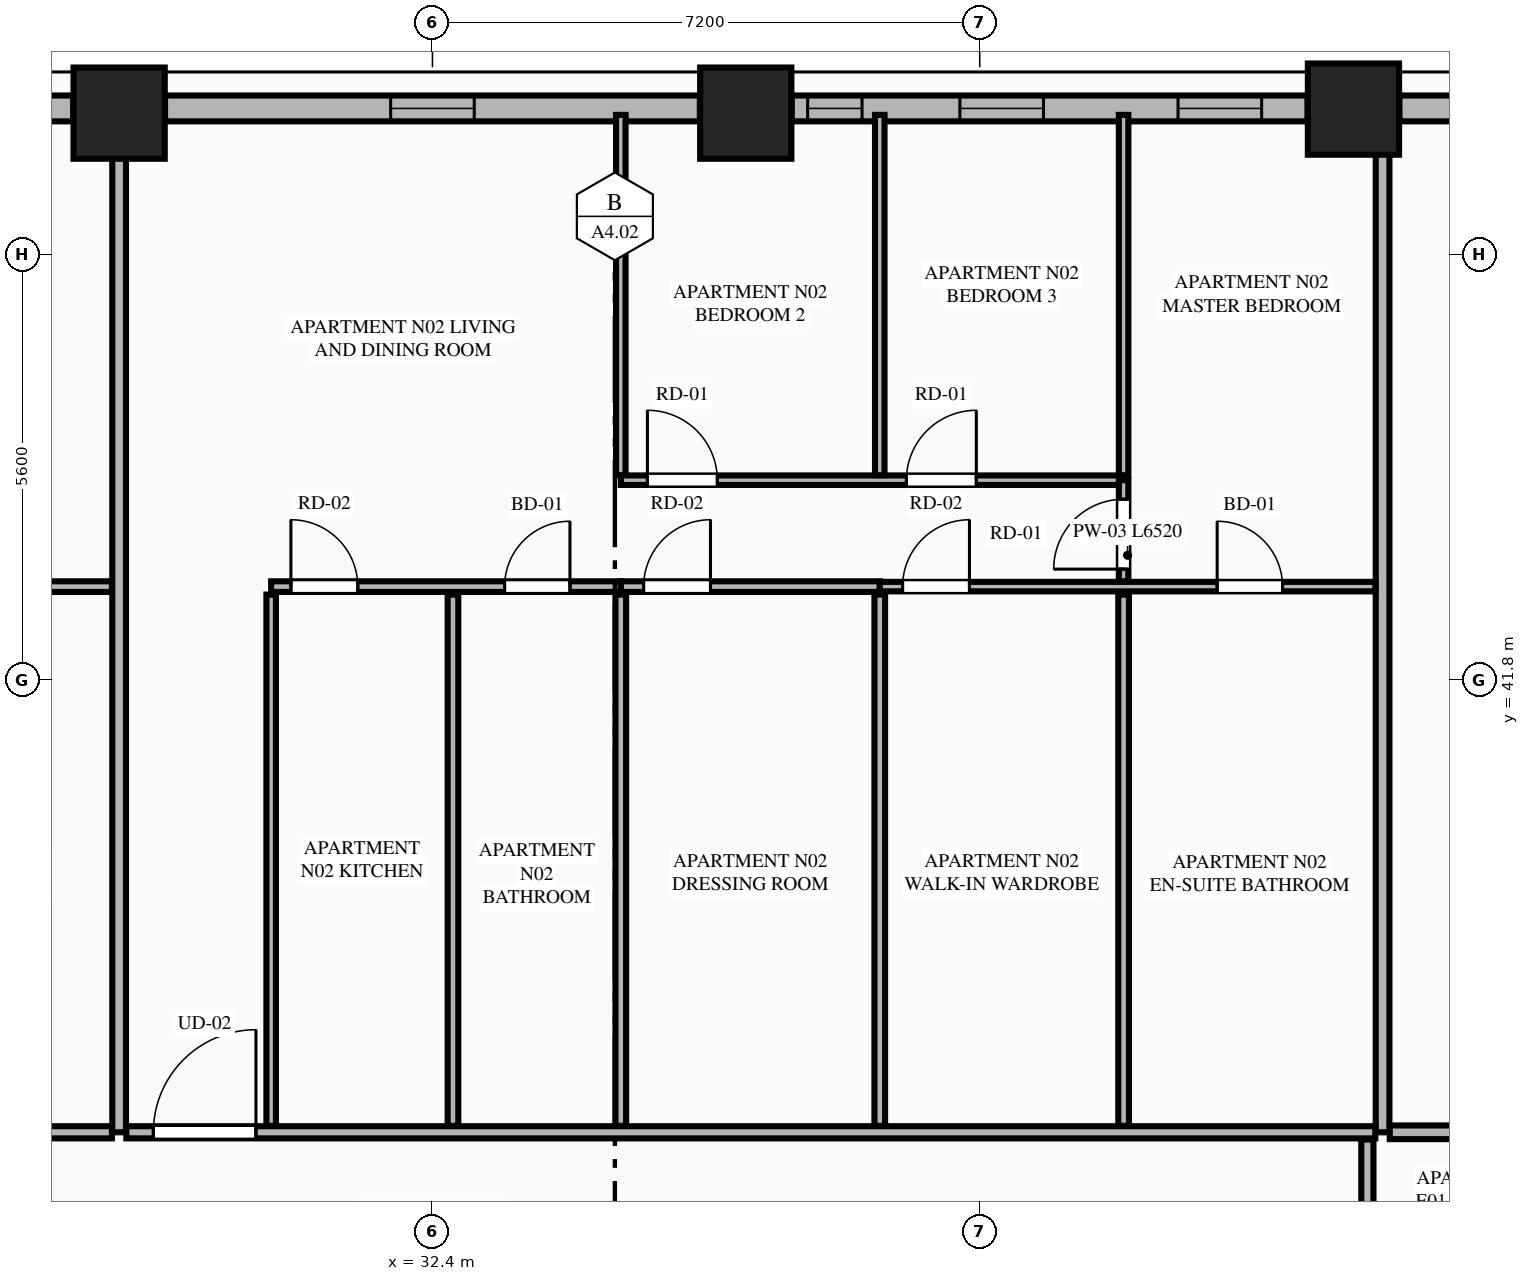
"""IFC4 building model, lengths in metres.
Left out: names, types, materials, properties, quantities, classifications, styles, units other than length and angle.
Written with IfcOpenShell. Run it as: python <this file> out.ifc"""

import sys

from ifc_helpers import new_model, si_unit, direction, frame, frame_2d, origin, origin_2d, place, context, subcontext, project, spatial, rectangle, extrude, element, fill, save


model = new_model("IFC4")
c1 = context("Model", 3, precision=1e-05, world=origin(), true_north=direction((0.0, 1.0)))
c2 = subcontext(c1, "Body", "Model", "MODEL_VIEW")
j1 = project(units=[si_unit("LENGTHUNIT", "METRE"), si_unit("PLANEANGLEUNIT", "RADIAN")], contexts=[c1])
p1 = place(None, origin())
s1 = spatial("IfcSite", under=j1, at=p1, CompositionType="ELEMENT")
p2 = place(p1, origin())
s2 = spatial("IfcBuilding", under=s1, at=p2, CompositionType="ELEMENT")
p3 = place(p2, frame((0.0, 0.0, 60.4)))
s3 = spatial("IfcBuildingStorey", under=s2, at=p3, CompositionType="ELEMENT", Elevation=60.4)
for number, where, z_axis, x_axis in (
    (1, (44.517, 49.311, 0.0), (0.0, 0.0, 1.0), (1.0, 0.0, 0.0)),
    (2, (36.522, 49.258, 0.0), (0.0, 0.0, 1.0), (1.0, 0.0, 0.0)),
    (3, (28.278, 49.258, 0.0), (0.0, 0.0, 1.0), (1.0, 0.0, 0.0)),
):
    element("IfcColumn", number, at=place(p3, frame(where, z_axis=z_axis, x_axis=x_axis)), inside=s3, PredefinedType="COLUMN", context=c2, shape_type="SweptSolid", body=[
        extrude(rectangle(XDim=1.2, YDim=1.2, at=origin_2d()), origin(), (0.0, 0.0, 1.0), 3.55),
    ])
p4 = place(p3, frame((46.366, 49.32, 0.0), z_axis=(0.0, 0.0, 1.0), x_axis=(-1.0, 0.0, 0.0)))
e4 = element("IfcWall", 4, at=p4, inside=s3, PredefinedType="STANDARD", context=c2, shape_type="SweptSolid", body=[
    extrude(rectangle(XDim=1.245, YDim=0.34, at=frame_2d((0.623, 0.0))), origin(), (0.0, 0.0, 1.0), 3.33),
])
p5 = place(p3, frame((43.913, 49.32, 0.0), z_axis=(0.0, 0.0, 1.0), x_axis=(-1.0, 0.0, 0.0)))
e5 = element("IfcWall", 5, at=p5, inside=s3, PredefinedType="STANDARD", context=c2, shape_type="SweptSolid", body=[
    extrude(rectangle(XDim=6.787, YDim=0.34, at=frame_2d((3.394, 0.0))), origin(), (0.0, 0.0, 1.0), 2.787),
])
p6 = place(p5, frame((0.604, 0.0, 0.75)))
e6 = element("IfcOpeningElement", 6, at=p6, cuts=e5, PredefinedType="OPENING", context=c2, shape_type="SweptSolid", body=[
    extrude(rectangle(XDim=1.1, YDim=1.887, at=frame_2d((0.55, 0.943))), frame((0.0, 0.18, 0.0), z_axis=(0.0, -1.0, 0.0), x_axis=(1.0, 0.0, 0.0)), (0.0, 0.0, 1.0), 0.36),
])
p7 = place(p5, frame((3.474, 0.0, 0.75)))
e7 = element("IfcOpeningElement", 7, at=p7, cuts=e5, PredefinedType="OPENING", context=c2, shape_type="SweptSolid", body=[
    extrude(rectangle(XDim=1.1, YDim=1.887, at=frame_2d((0.55, 0.943))), frame((0.0, 0.18, 0.0), z_axis=(0.0, -1.0, 0.0), x_axis=(1.0, 0.0, 0.0)), (0.0, 0.0, 1.0), 0.36),
])
p8 = place(p5, frame((5.861, 0.0, 0.75)))
e8 = element("IfcOpeningElement", 8, at=p8, cuts=e5, PredefinedType="OPENING", context=c2, shape_type="SweptSolid", body=[
    extrude(rectangle(XDim=0.716, YDim=1.887, at=frame_2d((0.358, 0.943))), frame((0.0, 0.18, 0.0), z_axis=(0.0, -1.0, 0.0), x_axis=(1.0, 0.0, 0.0)), (0.0, 0.0, 1.0), 0.36),
])
p9 = place(p3, frame((35.918, 49.32, 0.0), z_axis=(0.0, 0.0, 1.0), x_axis=(-1.0, 0.0, 0.0)))
e9 = element("IfcWall", 9, at=p9, inside=s3, PredefinedType="STANDARD", context=c2, shape_type="SweptSolid", body=[
    extrude(rectangle(XDim=7.036, YDim=0.34, at=frame_2d((3.518, 0.0))), origin(), (0.0, 0.0, 1.0), 2.787),
])
p10 = place(p9, frame((2.968, 0.0, 0.75)))
e10 = element("IfcOpeningElement", 10, at=p10, cuts=e9, PredefinedType="OPENING", context=c2, shape_type="SweptSolid", body=[
    extrude(rectangle(XDim=1.1, YDim=1.887, at=frame_2d((0.55, 0.943))), frame((0.0, 0.18, 0.0), z_axis=(0.0, -1.0, 0.0), x_axis=(1.0, 0.0, 0.0)), (0.0, 0.0, 1.0), 0.36),
])
p11 = place(p3, frame((27.674, 49.32, 0.0), z_axis=(0.0, 0.0, 1.0), x_axis=(-1.0, 0.0, 0.0)))
e11 = element("IfcWall", 11, at=p11, inside=s3, PredefinedType="STANDARD", context=c2, shape_type="SweptSolid", body=[
    extrude(rectangle(XDim=6.787, YDim=0.34, at=frame_2d((3.394, 0.0))), origin(), (0.0, 0.0, 1.0), 2.787),
])
p12 = place(p11, frame((2.843, 0.0, 0.75)))
e12 = element("IfcOpeningElement", 12, at=p12, cuts=e11, PredefinedType="OPENING", context=c2, shape_type="SweptSolid", body=[
    extrude(rectangle(XDim=1.1, YDim=1.887, at=frame_2d((0.55, 0.943))), frame((0.0, 0.18, 0.0), z_axis=(0.0, -1.0, 0.0), x_axis=(1.0, 0.0, 0.0)), (0.0, 0.0, 1.0), 0.36),
])
p13 = place(p3, frame((28.278, 35.85, 0.0), z_axis=(0.0, 0.0, 1.0), x_axis=(0.0, 1.0, 0.0)))
e13 = element("IfcWall", 13, at=p13, inside=s3, PredefinedType="PARTITIONING", context=c2, shape_type="SweptSolid", body=[
    extrude(rectangle(XDim=13.295, YDim=0.18, at=frame_2d((6.647, 0.0))), origin(), (0.0, 0.0, 1.0), 2.636),
])
p14 = place(p3, frame((44.9, 35.85, 0.0), z_axis=(0.0, 0.0, 1.0), x_axis=(0.0, 1.0, 0.0)))
e14 = element("IfcWall", 14, at=p14, inside=s3, PredefinedType="PARTITIONING", context=c2, shape_type="SweptSolid", body=[
    extrude(rectangle(XDim=13.295, YDim=0.18, at=frame_2d((6.647, 0.0))), origin(), (0.0, 0.0, 1.0), 3.33),
])
p15 = place(p3, frame((19.995, 35.85, 0.0), z_axis=(0.0, 0.0, 1.0), x_axis=(1.0, 0.0, 0.0)))
e15 = element("IfcWall", 15, at=p15, inside=s3, PredefinedType="PARTITIONING", context=c2, shape_type="SweptSolid", body=[
    extrude(rectangle(XDim=8.188, YDim=0.16, at=frame_2d((4.094, 0.0))), origin(), (0.0, 0.0, 1.0), 3.33),
])
p16 = place(p15, frame((0.705, 0.0, 0.0)))
e16 = element("IfcOpeningElement", 16, at=p16, cuts=e15, PredefinedType="OPENING", context=c2, shape_type="SweptSolid", body=[
    extrude(rectangle(XDim=1.02, YDim=2.25, at=frame_2d((0.51, 1.125))), frame((0.0, 0.09, 0.0), z_axis=(0.0, -1.0, 0.0), x_axis=(1.0, 0.0, 0.0)), (0.0, 0.0, 1.0), 0.18),
])
p17 = place(p3, frame((22.25, 43.029, 0.0), z_axis=(0.0, 0.0, 1.0), x_axis=(1.0, 0.0, 0.0)))
e17 = element("IfcWall", 17, at=p17, inside=s3, PredefinedType="PLUMBINGWALL", context=c2, shape_type="SweptSolid", body=[
    extrude(rectangle(XDim=5.933, YDim=0.14, at=frame_2d((2.967, 0.0))), origin(), (0.0, 0.0, 1.0), 3.33),
])
p18 = place(p17, frame((3.988, 0.0, 0.0)))
e18 = element("IfcOpeningElement", 18, at=p18, cuts=e17, PredefinedType="OPENING", context=c2, shape_type="SweptSolid", body=[
    extrude(rectangle(XDim=0.86, YDim=2.1, at=frame_2d((0.43, 1.05))), frame((0.0, 0.08, 0.0), z_axis=(0.0, -1.0, 0.0), x_axis=(1.0, 0.0, 0.0)), (0.0, 0.0, 1.0), 0.16),
])
p19 = place(p17, frame((0.22, 0.0, 0.0)))
e19 = element("IfcOpeningElement", 19, at=p19, cuts=e17, PredefinedType="OPENING", context=c2, shape_type="SweptSolid", body=[
    extrude(rectangle(XDim=0.88, YDim=2.15, at=frame_2d((0.44, 1.075))), frame((0.0, 0.08, 0.0), z_axis=(0.0, -1.0, 0.0), x_axis=(1.0, 0.0, 0.0)), (0.0, 0.0, 1.0), 0.16),
])
p20 = place(p3, frame((28.373, 35.85, 0.0), z_axis=(0.0, 0.0, 1.0), x_axis=(1.0, 0.0, 0.0)))
e20 = element("IfcWall", 20, at=p20, inside=s3, PredefinedType="PARTITIONING", context=c2, shape_type="SweptSolid", body=[
    extrude(rectangle(XDim=16.432, YDim=0.16, at=frame_2d((8.216, 0.0))), origin(), (0.0, 0.0, 1.0), 3.33),
])
p21 = place(p20, frame((0.355, 0.0, 0.0)))
e21 = element("IfcOpeningElement", 21, at=p21, cuts=e20, PredefinedType="OPENING", context=c2, shape_type="SweptSolid", body=[
    extrude(rectangle(XDim=1.35, YDim=2.35, at=frame_2d((0.675, 1.175))), frame((0.0, 0.09, 0.0), z_axis=(0.0, -1.0, 0.0), x_axis=(1.0, 0.0, 0.0)), (0.0, 0.0, 1.0), 0.18),
])
p22 = place(p3, frame((30.278, 35.935, 0.0), z_axis=(0.0, 0.0, 1.0), x_axis=(0.0, 1.0, 0.0)))
e22 = element("IfcWall", 22, at=p22, inside=s3, PredefinedType="PARTITIONING", context=c2, shape_type="SweptSolid", body=[
    extrude(rectangle(XDim=6.989, YDim=0.125, at=frame_2d((3.495, 0.0))), origin(), (0.0, 0.0, 1.0), 3.33),
])
p23 = place(p3, frame((30.278, 43.029, 0.0), z_axis=(0.0, 0.0, 1.0), x_axis=(1.0, 0.0, 0.0)))
e23 = element("IfcWall", 23, at=p23, inside=s3, PredefinedType="PLUMBINGWALL", context=c2, shape_type="SweptSolid", body=[
    extrude(rectangle(XDim=4.6, YDim=0.14, at=frame_2d((2.3, 0.0))), origin(), (0.0, 0.0, 1.0), 3.33),
])
p24 = place(p23, frame((3.071, 0.0, 0.0)))
e24 = element("IfcOpeningElement", 24, at=p24, cuts=e23, PredefinedType="OPENING", context=c2, shape_type="SweptSolid", body=[
    extrude(rectangle(XDim=0.86, YDim=2.1, at=frame_2d((0.43, 1.05))), frame((0.0, 0.08, 0.0), z_axis=(0.0, -1.0, 0.0), x_axis=(1.0, 0.0, 0.0)), (0.0, 0.0, 1.0), 0.16),
])
p25 = place(p23, frame((0.26, 0.0, 0.0)))
e25 = element("IfcOpeningElement", 25, at=p25, cuts=e23, PredefinedType="OPENING", context=c2, shape_type="SweptSolid", body=[
    extrude(rectangle(XDim=0.88, YDim=2.15, at=frame_2d((0.44, 1.075))), frame((0.0, 0.08, 0.0), z_axis=(0.0, -1.0, 0.0), x_axis=(1.0, 0.0, 0.0)), (0.0, 0.0, 1.0), 0.16),
])
p26 = place(p3, frame((34.878, 43.029, 0.0), z_axis=(0.0, 0.0, 1.0), x_axis=(1.0, 0.0, 0.0)))
e26 = element("IfcWall", 26, at=p26, inside=s3, PredefinedType="PLUMBINGWALL", context=c2, shape_type="SweptSolid", body=[
    extrude(rectangle(XDim=3.407, YDim=0.14, at=frame_2d((1.704, 0.0))), origin(), (0.0, 0.0, 1.0), 3.33),
])
p27 = place(p26, frame((0.3, 0.0, 0.0)))
e27 = element("IfcOpeningElement", 27, at=p27, cuts=e26, PredefinedType="OPENING", context=c2, shape_type="SweptSolid", body=[
    extrude(rectangle(XDim=0.88, YDim=2.15, at=frame_2d((0.44, 1.075))), frame((0.0, 0.08, 0.0), z_axis=(0.0, -1.0, 0.0), x_axis=(1.0, 0.0, 0.0)), (0.0, 0.0, 1.0), 0.16),
])
p28 = place(p3, frame((38.285, 43.029, 0.0), z_axis=(0.0, 0.0, 1.0), x_axis=(1.0, 0.0, 0.0)))
e28 = element("IfcWall", 28, at=p28, inside=s3, PredefinedType="PARTITIONING", context=c2, shape_type="SweptSolid", body=[
    extrude(rectangle(XDim=6.52, YDim=0.125, at=frame_2d((3.26, 0.0))), origin(), (0.0, 0.0, 1.0), 3.33),
])
p29 = place(p28, frame((4.439, 0.0, 0.0)))
e29 = element("IfcOpeningElement", 29, at=p29, cuts=e28, PredefinedType="OPENING", context=c2, shape_type="SweptSolid", body=[
    extrude(rectangle(XDim=0.86, YDim=2.1, at=frame_2d((0.43, 1.05))), frame((0.0, 0.073, 0.0), z_axis=(0.0, -1.0, 0.0), x_axis=(1.0, 0.0, 0.0)), (0.0, 0.0, 1.0), 0.145),
])
p30 = place(p28, frame((0.3, 0.0, 0.0)))
e30 = element("IfcOpeningElement", 30, at=p30, cuts=e28, PredefinedType="OPENING", context=c2, shape_type="SweptSolid", body=[
    extrude(rectangle(XDim=0.88, YDim=2.15, at=frame_2d((0.44, 1.075))), frame((0.0, 0.073, 0.0), z_axis=(0.0, -1.0, 0.0), x_axis=(1.0, 0.0, 0.0)), (0.0, 0.0, 1.0), 0.145),
])
p31 = place(p3, frame((32.67, 35.935, 0.0), z_axis=(0.0, 0.0, 1.0), x_axis=(0.0, 1.0, 0.0)))
e31 = element("IfcWall", 31, at=p31, inside=s3, PredefinedType="PLUMBINGWALL", context=c2, shape_type="SweptSolid", body=[
    extrude(rectangle(XDim=6.989, YDim=0.14, at=frame_2d((3.495, 0.0))), origin(), (0.0, 0.0, 1.0), 3.33),
])
p32 = place(p3, frame((34.878, 44.494, 0.0), z_axis=(0.0, 0.0, 1.0), x_axis=(0.0, 1.0, 0.0)))
e32 = element("IfcWall", 32, at=p32, inside=s3, PredefinedType="PARTITIONING", context=c2, shape_type="SweptSolid", body=[
    extrude(rectangle(XDim=4.741, YDim=0.125, at=frame_2d((2.371, 0.0))), origin(), (0.0, 0.0, 1.0), 3.33),
])
p33 = place(p3, frame((34.878, 44.429, 0.0), z_axis=(0.0, 0.0, 1.0), x_axis=(1.0, 0.0, 0.0)))
e33 = element("IfcWall", 33, at=p33, inside=s3, PredefinedType="PARTITIONING", context=c2, shape_type="SweptSolid", body=[
    extrude(rectangle(XDim=6.615, YDim=0.125, at=frame_2d((3.308, 0.0))), origin(), (0.0, 0.0, 1.0), 3.33),
])
p34 = place(p33, frame((0.35, 0.0, 0.0)))
e34 = element("IfcOpeningElement", 34, at=p34, cuts=e33, PredefinedType="OPENING", context=c2, shape_type="SweptSolid", body=[
    extrude(rectangle(XDim=0.92, YDim=2.15, at=frame_2d((0.46, 1.075))), frame((0.0, 0.073, 0.0), z_axis=(0.0, -1.0, 0.0), x_axis=(1.0, 0.0, 0.0)), (0.0, 0.0, 1.0), 0.145),
])
p35 = place(p33, frame((3.757, 0.0, 0.0)))
e35 = element("IfcOpeningElement", 35, at=p35, cuts=e33, PredefinedType="OPENING", context=c2, shape_type="SweptSolid", body=[
    extrude(rectangle(XDim=0.92, YDim=2.15, at=frame_2d((0.46, 1.075))), frame((0.0, 0.073, 0.0), z_axis=(0.0, -1.0, 0.0), x_axis=(1.0, 0.0, 0.0)), (0.0, 0.0, 1.0), 0.145),
])
p36 = place(p3, frame((41.493, 43.099, 0.0), z_axis=(0.0, 0.0, 1.0), x_axis=(0.0, 1.0, 0.0)))
e36 = element("IfcWall", 36, at=p36, inside=s3, PredefinedType="PARTITIONING", context=c2, shape_type="SweptSolid", body=[
    extrude(rectangle(XDim=1.33, YDim=0.125, at=frame_2d((0.665, 0.0))), origin(), (0.0, 0.0, 1.0), 3.33),
])
p37 = place(p36, frame((0.16, 0.0, 0.0)))
e37 = element("IfcOpeningElement", 37, at=p37, cuts=e36, PredefinedType="OPENING", context=c2, shape_type="SweptSolid", body=[
    extrude(rectangle(XDim=0.92, YDim=2.15, at=frame_2d((0.46, 1.075))), frame((0.0, 0.073, 0.0), z_axis=(0.0, -1.0, 0.0), x_axis=(1.0, 0.0, 0.0)), (0.0, 0.0, 1.0), 0.145),
])
for number, where, z_axis, x_axis in (
    (38, (34.878, 35.935, 0.0), (0.0, 0.0, 1.0), (0.0, 1.0, 0.0)),
    (39, (38.285, 35.935, 0.0), (0.0, 0.0, 1.0), (0.0, 1.0, 0.0)),
):
    element("IfcWall", number, at=place(p3, frame(where, z_axis=z_axis, x_axis=x_axis)), inside=s3, PredefinedType="PLUMBINGWALL", context=c2, shape_type="SweptSolid", body=[
        extrude(rectangle(XDim=6.989, YDim=0.14, at=frame_2d((3.495, 0.0))), origin(), (0.0, 0.0, 1.0), 3.33),
    ])
for number, where, z_axis, x_axis in (
    (40, (38.285, 44.494, 0.0), (0.0, 0.0, 1.0), (0.0, 1.0, 0.0)),
    (41, (41.493, 44.494, 0.0), (0.0, 0.0, 1.0), (0.0, 1.0, 0.0)),
):
    element("IfcWall", number, at=place(p3, frame(where, z_axis=z_axis, x_axis=x_axis)), inside=s3, PredefinedType="PARTITIONING", context=c2, shape_type="SweptSolid", body=[
        extrude(rectangle(XDim=4.741, YDim=0.125, at=frame_2d((2.371, 0.0))), origin(), (0.0, 0.0, 1.0), 3.33),
    ])
p38 = place(p3, frame((41.493, 35.935, 0.0), z_axis=(0.0, 0.0, 1.0), x_axis=(0.0, 1.0, 0.0)))
e42 = element("IfcWall", 42, at=p38, inside=s3, PredefinedType="PLUMBINGWALL", context=c2, shape_type="SweptSolid", body=[
    extrude(rectangle(XDim=6.989, YDim=0.14, at=frame_2d((3.495, 0.0))), origin(), (0.0, 0.0, 1.0), 3.33),
])
p39 = place(p3, frame((44.995, 35.85, 0.0), z_axis=(0.0, 0.0, 1.0), x_axis=(1.0, 0.0, 0.0)))
e43 = element("IfcWall", 43, at=p39, inside=s3, PredefinedType="PARTITIONING", context=c2, shape_type="SweptSolid", body=[
    extrude(rectangle(XDim=9.14, YDim=0.18, at=frame_2d((4.57, 0.0))), origin(), (0.0, 0.0, 1.0), 3.33),
])
p40 = place(p3, frame((44.7, 16.045, 0.0), z_axis=(0.0, 0.0, 1.0), x_axis=(0.0, 1.0, 0.0)))
e44 = element("IfcWall", 44, at=p40, inside=s3, PredefinedType="PARTITIONING", context=c2, shape_type="SweptSolid", body=[
    extrude(rectangle(XDim=19.71, YDim=0.16, at=frame_2d((9.855, 0.0))), origin(), (0.0, 0.0, 1.0), 3.33),
])
p41 = place(p40, frame((0.45, 0.0, 0.0)))
e45 = element("IfcOpeningElement", 45, at=p41, cuts=e44, PredefinedType="OPENING", context=c2, shape_type="SweptSolid", body=[
    extrude(rectangle(XDim=1.02, YDim=2.25, at=frame_2d((0.51, 1.125))), frame((0.0, 0.09, 0.0), z_axis=(0.0, -1.0, 0.0), x_axis=(1.0, 0.0, 0.0)), (0.0, 0.0, 1.0), 0.18),
])
p42 = place(p6, origin())
e46 = element("IfcWindow", 46, at=p42, inside=s3, PartitioningType="SINGLE_PANEL", PredefinedType="WINDOW", context=c2, shape_type="SweptSolid", body=[
    extrude(rectangle(XDim=1.1, YDim=1.887, at=frame_2d((0.55, 0.943))), frame((0.0, 0.03, 0.0), z_axis=(0.0, -1.0, 0.0), x_axis=(1.0, 0.0, 0.0)), (0.0, 0.0, 1.0), 0.06),
])
fill(e6, e46)
p43 = place(p10, origin())
e47 = element("IfcWindow", 47, at=p43, inside=s3, PartitioningType="SINGLE_PANEL", PredefinedType="WINDOW", context=c2, shape_type="SweptSolid", body=[
    extrude(rectangle(XDim=1.1, YDim=1.887, at=frame_2d((0.55, 0.943))), frame((0.0, 0.03, 0.0), z_axis=(0.0, -1.0, 0.0), x_axis=(1.0, 0.0, 0.0)), (0.0, 0.0, 1.0), 0.06),
])
fill(e10, e47)
p44 = place(p24, origin())
e48 = element("IfcDoor", 48, at=p44, inside=s3, OperationType="SINGLE_SWING_RIGHT", PredefinedType="DOOR", context=c2, shape_type="SweptSolid", body=[
    extrude(rectangle(XDim=0.86, YDim=2.1, at=frame_2d((0.43, 1.05))), frame((0.0, 0.025, 0.0), z_axis=(0.0, -1.0, 0.0), x_axis=(1.0, 0.0, 0.0)), (0.0, 0.0, 1.0), 0.05),
])
fill(e24, e48)
p45 = place(p29, origin())
e49 = element("IfcDoor", 49, at=p45, inside=s3, OperationType="SINGLE_SWING_LEFT", PredefinedType="DOOR", context=c2, shape_type="SweptSolid", body=[
    extrude(rectangle(XDim=0.86, YDim=2.1, at=frame_2d((0.43, 1.05))), frame((0.0, 0.025, 0.0), z_axis=(0.0, -1.0, 0.0), x_axis=(1.0, 0.0, 0.0)), (0.0, 0.0, 1.0), 0.05),
])
fill(e29, e49)
p46 = place(p21, origin())
e50 = element("IfcDoor", 50, at=p46, inside=s3, OperationType="SINGLE_SWING_RIGHT", PredefinedType="DOOR", context=c2, shape_type="SweptSolid", body=[
    extrude(rectangle(XDim=1.35, YDim=2.35, at=frame_2d((0.675, 1.175))), frame((0.0, 0.025, 0.0), z_axis=(0.0, -1.0, 0.0), x_axis=(1.0, 0.0, 0.0)), (0.0, 0.0, 1.0), 0.05),
])
fill(e21, e50)
p47 = place(p25, origin())
e51 = element("IfcDoor", 51, at=p47, inside=s3, OperationType="SINGLE_SWING_LEFT", PredefinedType="DOOR", context=c2, shape_type="SweptSolid", body=[
    extrude(rectangle(XDim=0.88, YDim=2.15, at=frame_2d((0.44, 1.075))), frame((0.0, 0.025, 0.0), z_axis=(0.0, -1.0, 0.0), x_axis=(1.0, 0.0, 0.0)), (0.0, 0.0, 1.0), 0.05),
])
fill(e25, e51)
p48 = place(p27, origin())
e52 = element("IfcDoor", 52, at=p48, inside=s3, OperationType="SINGLE_SWING_RIGHT", PredefinedType="DOOR", context=c2, shape_type="SweptSolid", body=[
    extrude(rectangle(XDim=0.88, YDim=2.15, at=frame_2d((0.44, 1.075))), frame((0.0, 0.025, 0.0), z_axis=(0.0, -1.0, 0.0), x_axis=(1.0, 0.0, 0.0)), (0.0, 0.0, 1.0), 0.05),
])
fill(e27, e52)
p49 = place(p34, origin())
e53 = element("IfcDoor", 53, at=p49, inside=s3, OperationType="SINGLE_SWING_LEFT", PredefinedType="DOOR", context=c2, shape_type="SweptSolid", body=[
    extrude(rectangle(XDim=0.92, YDim=2.15, at=frame_2d((0.46, 1.075))), frame((0.0, 0.025, 0.0), z_axis=(0.0, -1.0, 0.0), x_axis=(1.0, 0.0, 0.0)), (0.0, 0.0, 1.0), 0.05),
])
fill(e34, e53)
p50 = place(p35, origin())
e54 = element("IfcDoor", 54, at=p50, inside=s3, OperationType="SINGLE_SWING_RIGHT", PredefinedType="DOOR", context=c2, shape_type="SweptSolid", body=[
    extrude(rectangle(XDim=0.92, YDim=2.15, at=frame_2d((0.46, 1.075))), frame((0.0, 0.025, 0.0), z_axis=(0.0, -1.0, 0.0), x_axis=(1.0, 0.0, 0.0)), (0.0, 0.0, 1.0), 0.05),
])
fill(e35, e54)
p51 = place(p37, origin())
e55 = element("IfcDoor", 55, at=p51, inside=s3, OperationType="SINGLE_SWING_LEFT", PredefinedType="DOOR", context=c2, shape_type="SweptSolid", body=[
    extrude(rectangle(XDim=0.92, YDim=2.15, at=frame_2d((0.46, 1.075))), frame((0.0, 0.025, 0.0), z_axis=(0.0, -1.0, 0.0), x_axis=(1.0, 0.0, 0.0)), (0.0, 0.0, 1.0), 0.05),
])
fill(e37, e55)
p52 = place(p30, origin())
e56 = element("IfcDoor", 56, at=p52, inside=s3, OperationType="SINGLE_SWING_RIGHT", PredefinedType="DOOR", context=c2, shape_type="SweptSolid", body=[
    extrude(rectangle(XDim=0.88, YDim=2.15, at=frame_2d((0.44, 1.075))), frame((0.0, 0.025, 0.0), z_axis=(0.0, -1.0, 0.0), x_axis=(1.0, 0.0, 0.0)), (0.0, 0.0, 1.0), 0.05),
])
fill(e30, e56)
p53 = place(p7, origin())
e57 = element("IfcWindow", 57, at=p53, inside=s3, PartitioningType="SINGLE_PANEL", PredefinedType="WINDOW", context=c2, shape_type="SweptSolid", body=[
    extrude(rectangle(XDim=1.1, YDim=1.887, at=frame_2d((0.55, 0.943))), frame((0.0, 0.03, 0.0), z_axis=(0.0, -1.0, 0.0), x_axis=(1.0, 0.0, 0.0)), (0.0, 0.0, 1.0), 0.06),
])
fill(e7, e57)
p54 = place(p8, origin())
e58 = element("IfcWindow", 58, at=p54, inside=s3, PartitioningType="SINGLE_PANEL", PredefinedType="WINDOW", context=c2, shape_type="SweptSolid", body=[
    extrude(rectangle(XDim=0.716, YDim=1.887, at=frame_2d((0.358, 0.943))), frame((0.0, 0.03, 0.0), z_axis=(0.0, -1.0, 0.0), x_axis=(1.0, 0.0, 0.0)), (0.0, 0.0, 1.0), 0.06),
])
fill(e8, e58)
save(model, sys.argv[1])
